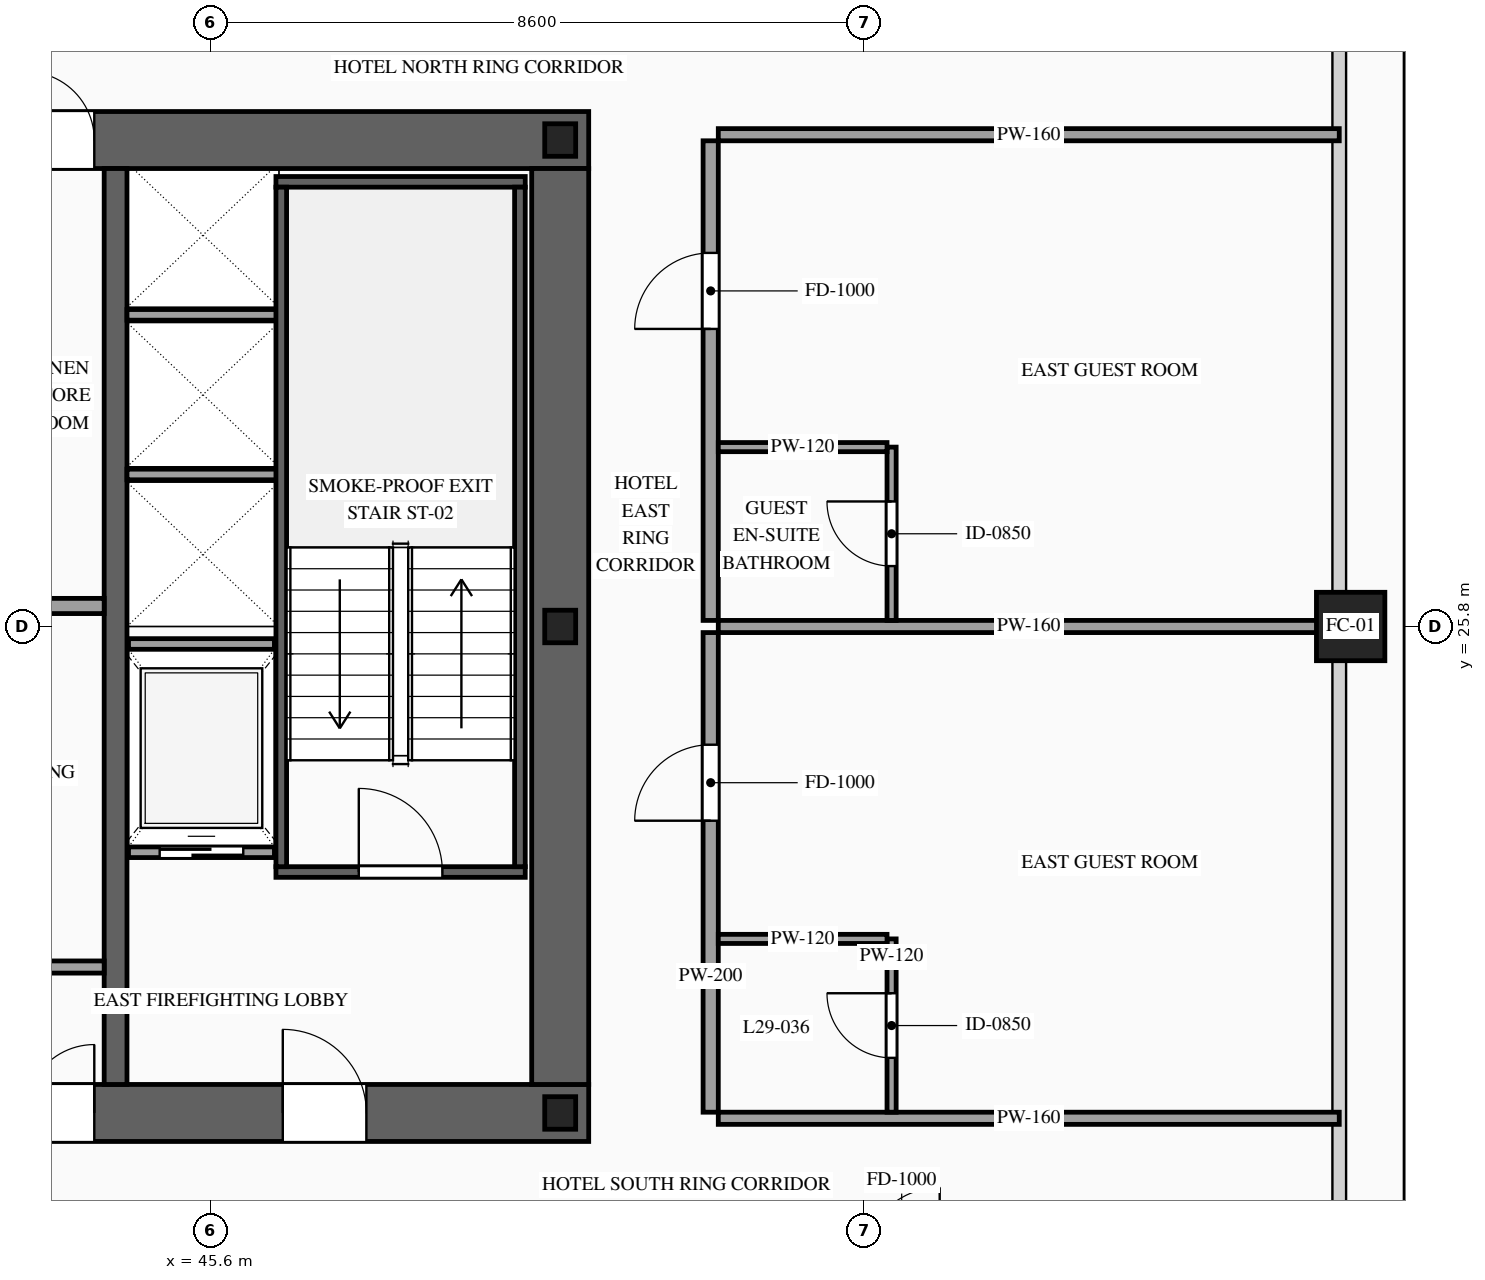
"""IFC4 building model, lengths in metres.
Left out: names, types, materials, properties, quantities, classifications, styles, units other than length and angle.
Written with IfcOpenShell. Run it as: python <this file> out.ifc"""

import sys

from ifc_helpers import new_model, si_unit, direction, frame, frame_2d, origin, origin_2d, place, context, subcontext, project, spatial, rectangle, hollow_rectangle, i_section, extrude, source, transform, mapped, element, fill, save


model = new_model("IFC4")
c1 = context("Model", 3, precision=1e-05, world=origin(), true_north=direction((0.0, 1.0)))
c2 = subcontext(c1, "Body", "Model", "MODEL_VIEW")
j1 = project(units=[si_unit("LENGTHUNIT", "METRE"), si_unit("PLANEANGLEUNIT", "RADIAN")], contexts=[c1])
p1 = place(None, origin())
s1 = spatial("IfcSite", under=j1, at=p1, CompositionType="ELEMENT")
p2 = place(p1, origin())
s2 = spatial("IfcBuilding", under=s1, at=p2, CompositionType="ELEMENT")
p3 = place(p2, frame((0.0, 0.0, 111.8)))
s3 = spatial("IfcBuildingStorey", under=s2, at=p3, CompositionType="ELEMENT", Elevation=111.8)
p4 = place(p3, frame((23.425, 19.4, 0.0), z_axis=(0.0, 0.0, 1.0), x_axis=(1.0, 0.0, 0.0)))
e1 = element("IfcWall", 1, at=p4, inside=s3, PredefinedType="SHEAR", context=c2, shape_type="SweptSolid", body=[
    extrude(rectangle(XDim=27.15, YDim=0.75, at=frame_2d((13.575, 0.0))), origin(), (0.0, 0.0, 1.0), 3.6),
])
p5 = place(p4, frame((2.025, 0.0, 0.0)))
e2 = element("IfcOpeningElement", 2, at=p5, cuts=e1, PredefinedType="OPENING", context=c2, shape_type="SweptSolid", body=[
    extrude(rectangle(XDim=1.1, YDim=2.2, at=frame_2d((0.55, 1.1))), frame((0.0, 0.39, 0.0), z_axis=(0.0, -1.0, 0.0), x_axis=(1.0, 0.0, 0.0)), (0.0, 0.0, 1.0), 0.78),
])
p6 = place(p4, frame((9.925, 0.0, 0.0)))
e3 = element("IfcOpeningElement", 3, at=p6, cuts=e1, PredefinedType="OPENING", context=c2, shape_type="SweptSolid", body=[
    extrude(rectangle(XDim=1.1, YDim=2.2, at=frame_2d((0.55, 1.1))), frame((0.0, 0.39, 0.0), z_axis=(0.0, -1.0, 0.0), x_axis=(1.0, 0.0, 0.0)), (0.0, 0.0, 1.0), 0.78),
])
p7 = place(p4, frame((23.125, 0.0, 0.0)))
e4 = element("IfcOpeningElement", 4, at=p7, cuts=e1, PredefinedType="OPENING", context=c2, shape_type="SweptSolid", body=[
    extrude(rectangle(XDim=1.1, YDim=2.2, at=frame_2d((0.55, 1.1))), frame((0.0, 0.39, 0.0), z_axis=(0.0, -1.0, 0.0), x_axis=(1.0, 0.0, 0.0)), (0.0, 0.0, 1.0), 0.78),
])
p8 = place(p4, frame((19.745, 0.0, 0.0)))
e5 = element("IfcOpeningElement", 5, at=p8, cuts=e1, PredefinedType="OPENING", context=c2, shape_type="SweptSolid", body=[
    extrude(rectangle(XDim=0.9, YDim=2.15, at=frame_2d((0.45, 1.075))), frame((0.0, 0.39, 0.0), z_axis=(0.0, -1.0, 0.0), x_axis=(1.0, 0.0, 0.0)), (0.0, 0.0, 1.0), 0.78),
])
p9 = place(p4, frame((18.305, 0.0, 0.0)))
e6 = element("IfcOpeningElement", 6, at=p9, cuts=e1, PredefinedType="OPENING", context=c2, shape_type="SweptSolid", body=[
    extrude(rectangle(XDim=0.9, YDim=2.15, at=frame_2d((0.45, 1.075))), frame((0.0, 0.39, 0.0), z_axis=(0.0, -1.0, 0.0), x_axis=(1.0, 0.0, 0.0)), (0.0, 0.0, 1.0), 0.78),
])
p10 = place(p3, frame((23.425, 32.2, 0.0), z_axis=(0.0, 0.0, 1.0), x_axis=(1.0, 0.0, 0.0)))
e7 = element("IfcWall", 7, at=p10, inside=s3, PredefinedType="SHEAR", context=c2, shape_type="SweptSolid", body=[
    extrude(rectangle(XDim=27.15, YDim=0.75, at=frame_2d((13.575, 0.0))), origin(), (0.0, 0.0, 1.0), 3.6),
])
p11 = place(p10, frame((4.645, 0.0, 0.0)))
e8 = element("IfcOpeningElement", 8, at=p11, cuts=e7, PredefinedType="OPENING", context=c2, shape_type="SweptSolid", body=[
    extrude(rectangle(XDim=0.9, YDim=2.15, at=frame_2d((0.45, 1.075))), frame((0.0, 0.39, 0.0), z_axis=(0.0, -1.0, 0.0), x_axis=(1.0, 0.0, 0.0)), (0.0, 0.0, 1.0), 0.78),
])
p12 = place(p10, frame((9.925, 0.0, 0.0)))
e9 = element("IfcOpeningElement", 9, at=p12, cuts=e7, PredefinedType="OPENING", context=c2, shape_type="SweptSolid", body=[
    extrude(rectangle(XDim=1.1, YDim=2.2, at=frame_2d((0.55, 1.1))), frame((0.0, 0.39, 0.0), z_axis=(0.0, -1.0, 0.0), x_axis=(1.0, 0.0, 0.0)), (0.0, 0.0, 1.0), 0.78),
])
p13 = place(p10, frame((15.775, 0.0, 0.0)))
e10 = element("IfcOpeningElement", 10, at=p13, cuts=e7, PredefinedType="OPENING", context=c2, shape_type="SweptSolid", body=[
    extrude(rectangle(XDim=1.1, YDim=2.2, at=frame_2d((0.55, 1.1))), frame((0.0, 0.39, 0.0), z_axis=(0.0, -1.0, 0.0), x_axis=(1.0, 0.0, 0.0)), (0.0, 0.0, 1.0), 0.78),
])
p14 = place(p10, frame((18.305, 0.0, 0.0)))
e11 = element("IfcOpeningElement", 11, at=p14, cuts=e7, PredefinedType="OPENING", context=c2, shape_type="SweptSolid", body=[
    extrude(rectangle(XDim=0.9, YDim=2.15, at=frame_2d((0.45, 1.075))), frame((0.0, 0.39, 0.0), z_axis=(0.0, -1.0, 0.0), x_axis=(1.0, 0.0, 0.0)), (0.0, 0.0, 1.0), 0.78),
])
p15 = place(p10, frame((19.745, 0.0, 0.0)))
e12 = element("IfcOpeningElement", 12, at=p15, cuts=e7, PredefinedType="OPENING", context=c2, shape_type="SweptSolid", body=[
    extrude(rectangle(XDim=0.9, YDim=2.15, at=frame_2d((0.45, 1.075))), frame((0.0, 0.39, 0.0), z_axis=(0.0, -1.0, 0.0), x_axis=(1.0, 0.0, 0.0)), (0.0, 0.0, 1.0), 0.78),
])
m1 = source(origin(), c2, "Body", "SweptSolid", [
    extrude(rectangle(XDim=12.05, YDim=0.75, at=frame_2d((6.025, 0.0))), origin(), (0.0, 0.0, 1.0), 3.6),
])
p16 = place(p3, frame((50.2, 19.775, 0.0), z_axis=(0.0, 0.0, 1.0), x_axis=(0.0, 1.0, 0.0)))
e13 = element("IfcWall", 13, at=p16, inside=s3, PredefinedType="SHEAR", context=c2, shape_type="MappedRepresentation", body=[
    mapped(m1, transform((0.0, 0.0, 0.0), scale=1.0)),
])
m2 = source(origin(), c2, "Body", "SweptSolid", [
    extrude(rectangle(XDim=12.05, YDim=0.3, at=frame_2d((6.025, 0.0))), origin(), (0.0, 0.0, 1.0), 3.6),
])
p17 = place(p3, frame((44.35, 19.775, 0.0), z_axis=(0.0, 0.0, 1.0), x_axis=(0.0, 1.0, 0.0)))
e14 = element("IfcWall", 14, at=p17, inside=s3, PredefinedType="SOLIDWALL", context=c2, shape_type="MappedRepresentation", body=[
    mapped(m2, transform((0.0, 0.0, 0.0), scale=1.0)),
])
m3 = source(origin(), c2, "Body", "SweptSolid", [
    extrude(i_section(OverallWidth=0.407, OverallDepth=0.428, WebThickness=0.02, FlangeThickness=0.035, at=origin_2d()), origin(), (0.0, 0.0, 1.0), 3.6),
])
for number, where, z_axis, x_axis in (
    (15, (50.2, 19.4, 0.0), (0.0, 0.0, 1.0), (1.0, 0.0, 0.0)),
    (16, (50.2, 25.8, 0.0), (0.0, 0.0, 1.0), (1.0, 0.0, 0.0)),
    (17, (50.2, 32.2, 0.0), (0.0, 0.0, 1.0), (1.0, 0.0, 0.0)),
):
    element("IfcColumn", number, at=place(p3, frame(where, z_axis=z_axis, x_axis=x_axis)), inside=s3, PredefinedType="COLUMN", context=c2, shape_type="MappedRepresentation", body=[
        mapped(m3, transform((0.0, 0.0, 0.0), scale=1.0)),
    ])
m4 = source(origin(), c2, "Body", "SweptSolid", [
    extrude(hollow_rectangle(XDim=0.9, YDim=0.9, WallThickness=0.042, at=origin_2d()), origin(), (0.0, 0.0, 1.0), 3.6),
])
p18 = place(p3, frame((60.6, 25.8, 0.0), z_axis=(0.0, 0.0, 1.0), x_axis=(1.0, 0.0, 0.0)))
e18 = element("IfcColumn", 18, at=p18, inside=s3, PredefinedType="COLUMN", context=c2, shape_type="MappedRepresentation", body=[
    mapped(m4, transform((0.0, 0.0, 0.0), scale=1.0)),
])
p19 = place(p3, frame((44.52, 22.83, 0.0), z_axis=(0.0, 0.0, 1.0), x_axis=(1.0, 0.0, 0.0)))
e19 = element("IfcWall", 19, at=p19, inside=s3, PredefinedType="SOLIDWALL", context=c2, shape_type="SweptSolid", body=[
    extrude(rectangle(XDim=1.92, YDim=0.14, at=frame_2d((0.96, 0.0))), origin(), (0.0, 0.0, 1.0), 3.38),
])
p20 = place(p19, frame((0.41, 0.0, 0.0)))
e20 = element("IfcOpeningElement", 20, at=p20, cuts=e19, PredefinedType="OPENING", context=c2, shape_type="SweptSolid", body=[
    extrude(rectangle(XDim=1.1, YDim=2.2, at=frame_2d((0.55, 1.1))), frame((0.0, 0.085, 0.0), z_axis=(0.0, -1.0, 0.0), x_axis=(1.0, 0.0, 0.0)), (0.0, 0.0, 1.0), 0.17),
])
m5 = source(origin(), c2, "Body", "SweptSolid", [
    extrude(rectangle(XDim=1.92, YDim=0.14, at=frame_2d((0.96, 0.0))), origin(), (0.0, 0.0, 1.0), 3.38),
])
p21 = place(p3, frame((44.52, 25.57, 0.0), z_axis=(0.0, 0.0, 1.0), x_axis=(1.0, 0.0, 0.0)))
e21 = element("IfcWall", 21, at=p21, inside=s3, PredefinedType="SOLIDWALL", context=c2, shape_type="MappedRepresentation", body=[
    mapped(m5, transform((0.0, 0.0, 0.0), scale=1.0)),
])
m6 = source(origin(), c2, "Body", "SweptSolid", [
    extrude(rectangle(XDim=2.0, YDim=0.14, at=frame_2d((1.0, 0.0))), origin(), (0.0, 0.0, 1.0), 3.38),
])
for number, where, z_axis, x_axis in (
    (22, (44.5, 27.8, 0.0), (0.0, 0.0, 1.0), (1.0, 0.0, 0.0)),
    (23, (44.5, 29.9, 0.0), (0.0, 0.0, 1.0), (1.0, 0.0, 0.0)),
):
    element("IfcWall", number, at=place(p3, frame(where, z_axis=z_axis, x_axis=x_axis)), inside=s3, PredefinedType="SOLIDWALL", context=c2, shape_type="MappedRepresentation", body=[
        mapped(m6, transform((0.0, 0.0, 0.0), scale=1.0)),
    ])
p22 = place(p3, frame((46.46, 22.57, 0.0), z_axis=(0.0, 0.0, 1.0), x_axis=(1.0, 0.0, 0.0)))
e24 = element("IfcWall", 24, at=p22, inside=s3, PredefinedType="SOLIDWALL", context=c2, shape_type="SweptSolid", body=[
    extrude(rectangle(XDim=3.28, YDim=0.14, at=frame_2d((1.64, 0.0))), origin(), (0.0, 0.0, 1.0), 3.38),
])
p23 = place(p22, frame((1.09, 0.0, 0.0)))
e25 = element("IfcOpeningElement", 25, at=p23, cuts=e24, PredefinedType="OPENING", context=c2, shape_type="SweptSolid", body=[
    extrude(rectangle(XDim=1.1, YDim=2.2, at=frame_2d((0.55, 1.1))), frame((0.0, 0.085, 0.0), z_axis=(0.0, -1.0, 0.0), x_axis=(1.0, 0.0, 0.0)), (0.0, 0.0, 1.0), 0.17),
])
m7 = source(origin(), c2, "Body", "SweptSolid", [
    extrude(rectangle(XDim=3.28, YDim=0.14, at=frame_2d((1.64, 0.0))), origin(), (0.0, 0.0, 1.0), 3.38),
])
p24 = place(p3, frame((46.46, 31.65, 0.0), z_axis=(0.0, 0.0, 1.0), x_axis=(1.0, 0.0, 0.0)))
e26 = element("IfcWall", 26, at=p24, inside=s3, PredefinedType="SOLIDWALL", context=c2, shape_type="MappedRepresentation", body=[
    mapped(m7, transform((0.0, 0.0, 0.0), scale=1.0)),
])
m8 = source(origin(), c2, "Body", "SweptSolid", [
    extrude(rectangle(XDim=8.94, YDim=0.14, at=frame_2d((4.47, 0.0))), origin(), (0.0, 0.0, 1.0), 3.38),
])
for number, where, z_axis, x_axis in (
    (27, (46.53, 22.64, 0.0), (0.0, 0.0, 1.0), (0.0, 1.0, 0.0)),
    (28, (49.67, 22.64, 0.0), (0.0, 0.0, 1.0), (0.0, 1.0, 0.0)),
):
    element("IfcWall", number, at=place(p3, frame(where, z_axis=z_axis, x_axis=x_axis)), inside=s3, PredefinedType="SOLIDWALL", context=c2, shape_type="MappedRepresentation", body=[
        mapped(m8, transform((0.0, 0.0, 0.0), scale=1.0)),
    ])
m9 = source(origin(), c2, "Body", "SweptSolid", [
    extrude(rectangle(XDim=1.17, YDim=0.16, at=frame_2d((0.585, 0.0))), origin(), (0.0, 0.0, 1.0), 3.38),
])
p25 = place(p3, frame((43.03, 21.32, 0.0), z_axis=(0.0, 0.0, 1.0), x_axis=(1.0, 0.0, 0.0)))
e29 = element("IfcWall", 29, at=p25, inside=s3, PredefinedType="PARTITIONING", context=c2, shape_type="MappedRepresentation", body=[
    mapped(m9, transform((0.0, 0.0, 0.0), scale=1.0)),
])
m10 = source(origin(), c2, "Body", "SweptSolid", [
    extrude(rectangle(XDim=2.7, YDim=0.2, at=frame_2d((1.35, 0.0))), origin(), (0.0, 0.0, 1.0), 3.38),
])
p26 = place(p3, frame((41.5, 26.07, 0.0), z_axis=(0.0, 0.0, 1.0), x_axis=(1.0, 0.0, 0.0)))
e30 = element("IfcWall", 30, at=p26, inside=s3, PredefinedType="PARTITIONING", context=c2, shape_type="MappedRepresentation", body=[
    mapped(m10, transform((0.0, 0.0, 0.0), scale=1.0)),
])
p27 = place(p3, frame((52.18, 19.41, 0.0), z_axis=(0.0, 0.0, 1.0), x_axis=(0.0, 1.0, 0.0)))
e31 = element("IfcWall", 31, at=p27, inside=s3, PredefinedType="PARTITIONING", context=c2, shape_type="SweptSolid", body=[
    extrude(rectangle(XDim=6.31, YDim=0.2, at=frame_2d((3.155, 0.0))), origin(), (0.0, 0.0, 1.0), 3.38),
])
p28 = place(p27, frame((3.835, 0.0, 0.0)))
e32 = element("IfcOpeningElement", 32, at=p28, cuts=e31, PredefinedType="OPENING", context=c2, shape_type="SweptSolid", body=[
    extrude(rectangle(XDim=1.0, YDim=2.2, at=frame_2d((0.5, 1.1))), frame((0.0, 0.115, 0.0), z_axis=(0.0, -1.0, 0.0), x_axis=(1.0, 0.0, 0.0)), (0.0, 0.0, 1.0), 0.23),
])
m11 = source(origin(), c2, "Body", "SweptSolid", [
    extrude(rectangle(XDim=8.17, YDim=0.16, at=frame_2d((4.085, 0.0))), origin(), (0.0, 0.0, 1.0), 2.675),
])
p29 = place(p3, frame((52.28, 25.8, 0.0), z_axis=(0.0, 0.0, 1.0), x_axis=(1.0, 0.0, 0.0)))
e33 = element("IfcWall", 33, at=p29, inside=s3, PredefinedType="PARTITIONING", context=c2, shape_type="MappedRepresentation", body=[
    mapped(m11, transform((0.0, 0.0, 0.0), scale=1.0)),
])
m12 = source(origin(), c2, "Body", "SweptSolid", [
    extrude(rectangle(XDim=8.17, YDim=0.16, at=frame_2d((4.085, 0.0))), origin(), (0.0, 0.0, 1.0), 2.875),
])
p30 = place(p3, frame((52.28, 19.33, 0.0), z_axis=(0.0, 0.0, 1.0), x_axis=(1.0, 0.0, 0.0)))
e34 = element("IfcWall", 34, at=p30, inside=s3, PredefinedType="PARTITIONING", context=c2, shape_type="MappedRepresentation", body=[
    mapped(m12, transform((0.0, 0.0, 0.0), scale=1.0)),
])
p31 = place(p3, frame((54.56, 19.41, 0.0), z_axis=(0.0, 0.0, 1.0), x_axis=(0.0, 1.0, 0.0)))
e35 = element("IfcWall", 35, at=p31, inside=s3, PredefinedType="PARTITIONING", context=c2, shape_type="SweptSolid", body=[
    extrude(rectangle(XDim=2.28, YDim=0.12, at=frame_2d((1.14, 0.0))), origin(), (0.0, 0.0, 1.0), 3.38),
])
p32 = place(p31, frame((0.715, 0.0, 0.0)))
e36 = element("IfcOpeningElement", 36, at=p32, cuts=e35, PredefinedType="OPENING", context=c2, shape_type="SweptSolid", body=[
    extrude(rectangle(XDim=0.85, YDim=2.1, at=frame_2d((0.425, 1.05))), frame((0.0, 0.075, 0.0), z_axis=(0.0, -1.0, 0.0), x_axis=(1.0, 0.0, 0.0)), (0.0, 0.0, 1.0), 0.15),
])
m13 = source(origin(), c2, "Body", "SweptSolid", [
    extrude(rectangle(XDim=2.22, YDim=0.12, at=frame_2d((1.11, 0.0))), origin(), (0.0, 0.0, 1.0), 3.38),
])
p33 = place(p3, frame((52.28, 21.69, 0.0), z_axis=(0.0, 0.0, 1.0), x_axis=(1.0, 0.0, 0.0)))
e37 = element("IfcWall", 37, at=p33, inside=s3, PredefinedType="PARTITIONING", context=c2, shape_type="MappedRepresentation", body=[
    mapped(m13, transform((0.0, 0.0, 0.0), scale=1.0)),
])
p34 = place(p3, frame((52.18, 25.88, 0.0), z_axis=(0.0, 0.0, 1.0), x_axis=(0.0, 1.0, 0.0)))
e38 = element("IfcWall", 38, at=p34, inside=s3, PredefinedType="PARTITIONING", context=c2, shape_type="SweptSolid", body=[
    extrude(rectangle(XDim=6.31, YDim=0.2, at=frame_2d((3.155, 0.0))), origin(), (0.0, 0.0, 1.0), 3.38),
])
p35 = place(p34, frame((3.835, 0.0, 0.0)))
e39 = element("IfcOpeningElement", 39, at=p35, cuts=e38, PredefinedType="OPENING", context=c2, shape_type="SweptSolid", body=[
    extrude(rectangle(XDim=1.0, YDim=2.2, at=frame_2d((0.5, 1.1))), frame((0.0, 0.115, 0.0), z_axis=(0.0, -1.0, 0.0), x_axis=(1.0, 0.0, 0.0)), (0.0, 0.0, 1.0), 0.23),
])
p36 = place(p3, frame((52.28, 32.27, 0.0), z_axis=(0.0, 0.0, 1.0), x_axis=(1.0, 0.0, 0.0)))
e40 = element("IfcWall", 40, at=p36, inside=s3, PredefinedType="PARTITIONING", context=c2, shape_type="MappedRepresentation", body=[
    mapped(m12, transform((0.0, 0.0, 0.0), scale=1.0)),
])
p37 = place(p3, frame((54.56, 25.88, 0.0), z_axis=(0.0, 0.0, 1.0), x_axis=(0.0, 1.0, 0.0)))
e41 = element("IfcWall", 41, at=p37, inside=s3, PredefinedType="PARTITIONING", context=c2, shape_type="SweptSolid", body=[
    extrude(rectangle(XDim=2.28, YDim=0.12, at=frame_2d((1.14, 0.0))), origin(), (0.0, 0.0, 1.0), 3.38),
])
p38 = place(p37, frame((0.715, 0.0, 0.0)))
e42 = element("IfcOpeningElement", 42, at=p38, cuts=e41, PredefinedType="OPENING", context=c2, shape_type="SweptSolid", body=[
    extrude(rectangle(XDim=0.85, YDim=2.1, at=frame_2d((0.425, 1.05))), frame((0.0, 0.075, 0.0), z_axis=(0.0, -1.0, 0.0), x_axis=(1.0, 0.0, 0.0)), (0.0, 0.0, 1.0), 0.15),
])
p39 = place(p3, frame((52.28, 28.16, 0.0), z_axis=(0.0, 0.0, 1.0), x_axis=(1.0, 0.0, 0.0)))
e43 = element("IfcWall", 43, at=p39, inside=s3, PredefinedType="PARTITIONING", context=c2, shape_type="MappedRepresentation", body=[
    mapped(m13, transform((0.0, 0.0, 0.0), scale=1.0)),
])
m14 = source(origin(), c2, "Body", "SweptSolid", [
    extrude(rectangle(XDim=1.1, YDim=2.2, at=frame_2d((0.55, 1.1))), frame((0.0, 0.025, 0.0), z_axis=(0.0, -1.0, 0.0), x_axis=(1.0, 0.0, 0.0)), (0.0, 0.0, 1.0), 0.05),
])
p40 = place(p20, origin())
e44 = element("IfcDoor", 44, at=p40, inside=s3, OperationType="SLIDING_TO_RIGHT", PredefinedType="DOOR", context=c2, shape_type="MappedRepresentation", body=[
    mapped(m14, transform((0.0, 0.0, 0.0), scale=1.0)),
])
fill(e20, e44)
m15 = source(origin(), c2, "Body", "SweptSolid", [
    extrude(rectangle(XDim=1.1, YDim=2.2, at=frame_2d((0.55, 1.1))), frame((0.0, 0.025, 0.0), z_axis=(0.0, -1.0, 0.0), x_axis=(1.0, 0.0, 0.0)), (0.0, 0.0, 1.0), 0.05),
])
p41 = place(p23, origin())
e45 = element("IfcDoor", 45, at=p41, inside=s3, OperationType="SINGLE_SWING_LEFT", PredefinedType="DOOR", context=c2, shape_type="MappedRepresentation", body=[
    mapped(m15, transform((0.0, 0.0, 0.0), scale=1.0)),
])
fill(e25, e45)
p42 = place(p7, origin())
e46 = element("IfcDoor", 46, at=p42, inside=s3, OperationType="SINGLE_SWING_LEFT", PredefinedType="DOOR", context=c2, shape_type="MappedRepresentation", body=[
    mapped(m15, transform((0.0, 0.0, 0.0), scale=1.0)),
])
fill(e4, e46)
m16 = source(origin(), c2, "Body", "SweptSolid", [
    extrude(rectangle(XDim=0.9, YDim=2.15, at=frame_2d((0.45, 1.075))), frame((0.0, 0.025, 0.0), z_axis=(0.0, -1.0, 0.0), x_axis=(1.0, 0.0, 0.0)), (0.0, 0.0, 1.0), 0.05),
])
p43 = place(p8, origin())
e47 = element("IfcDoor", 47, at=p43, inside=s3, OperationType="SINGLE_SWING_RIGHT", PredefinedType="DOOR", context=c2, shape_type="MappedRepresentation", body=[
    mapped(m16, transform((0.0, 0.0, 0.0), scale=1.0)),
])
fill(e5, e47)
p44 = place(p15, origin())
e48 = element("IfcDoor", 48, at=p44, inside=s3, OperationType="SINGLE_SWING_LEFT", PredefinedType="DOOR", context=c2, shape_type="MappedRepresentation", body=[
    mapped(m16, transform((0.0, 0.0, 0.0), scale=1.0)),
])
fill(e12, e48)
m17 = source(origin(), c2, "Body", "SweptSolid", [
    extrude(rectangle(XDim=1.0, YDim=2.2, at=frame_2d((0.5, 1.1))), frame((0.0, 0.025, 0.0), z_axis=(0.0, -1.0, 0.0), x_axis=(1.0, 0.0, 0.0)), (0.0, 0.0, 1.0), 0.05),
])
p45 = place(p28, origin())
e49 = element("IfcDoor", 49, at=p45, inside=s3, OperationType="SINGLE_SWING_LEFT", PredefinedType="DOOR", context=c2, shape_type="MappedRepresentation", body=[
    mapped(m17, transform((0.0, 0.0, 0.0), scale=1.0)),
])
fill(e32, e49)
m18 = source(origin(), c2, "Body", "SweptSolid", [
    extrude(rectangle(XDim=0.85, YDim=2.1, at=frame_2d((0.425, 1.05))), frame((0.0, 0.025, 0.0), z_axis=(0.0, -1.0, 0.0), x_axis=(1.0, 0.0, 0.0)), (0.0, 0.0, 1.0), 0.05),
])
p46 = place(p32, origin())
e50 = element("IfcDoor", 50, at=p46, inside=s3, OperationType="SINGLE_SWING_RIGHT", PredefinedType="DOOR", context=c2, shape_type="MappedRepresentation", body=[
    mapped(m18, transform((0.0, 0.0, 0.0), scale=1.0)),
])
fill(e36, e50)
p47 = place(p35, origin())
e51 = element("IfcDoor", 51, at=p47, inside=s3, OperationType="SINGLE_SWING_LEFT", PredefinedType="DOOR", context=c2, shape_type="MappedRepresentation", body=[
    mapped(m17, transform((0.0, 0.0, 0.0), scale=1.0)),
])
fill(e39, e51)
p48 = place(p38, origin())
e52 = element("IfcDoor", 52, at=p48, inside=s3, OperationType="SINGLE_SWING_RIGHT", PredefinedType="DOOR", context=c2, shape_type="MappedRepresentation", body=[
    mapped(m18, transform((0.0, 0.0, 0.0), scale=1.0)),
])
fill(e42, e52)
save(model, sys.argv[1])
